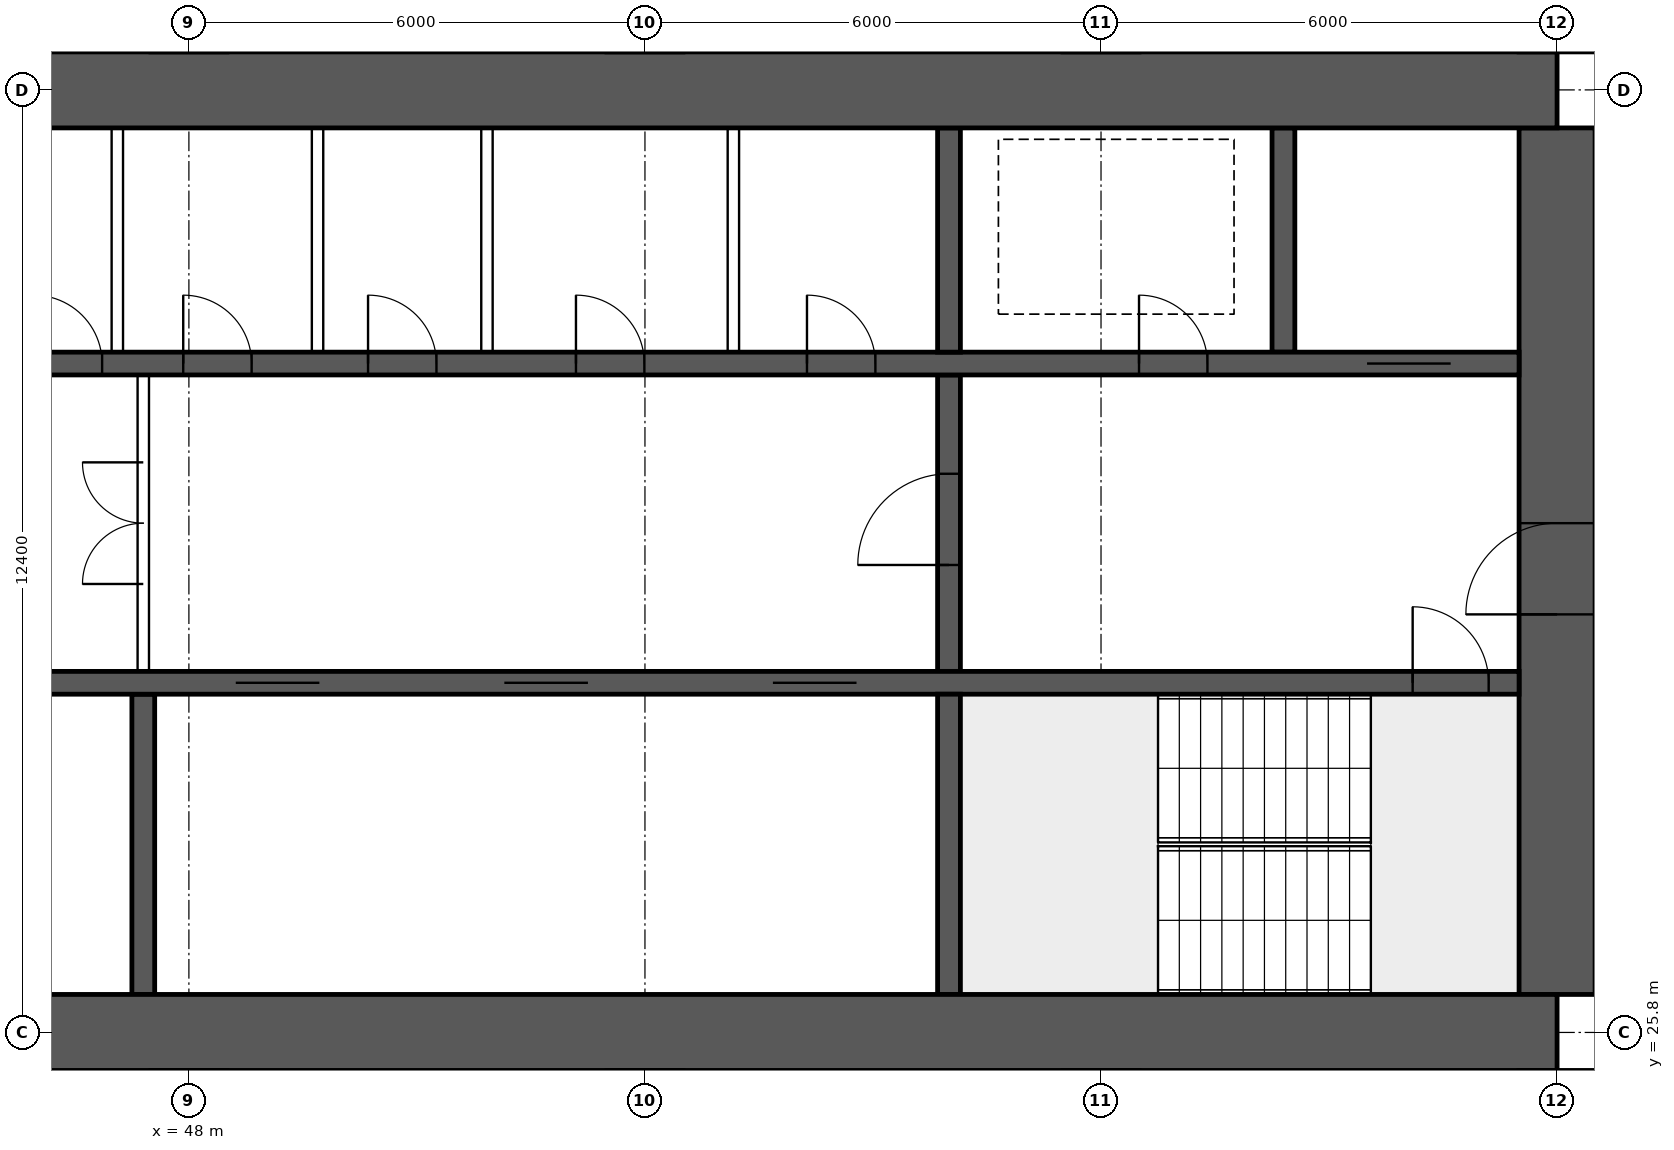
"""IFC4 building model, lengths in metres.
Left out: names, types, materials, properties, quantities, classifications, styles, units other than length and angle.
Written with IfcOpenShell. Run it as: python <this file> out.ifc"""

import sys

from ifc_helpers import new_model, si_unit, direction, frame, frame_2d, origin, place, context, subcontext, project, spatial, rectangle, extrude, element, fill, save


model = new_model("IFC4")
c1 = context("Model", 3, precision=1e-05, world=origin(), true_north=direction((0.0, 1.0)))
c2 = subcontext(c1, "Body", "Model", "MODEL_VIEW")
j1 = project(units=[si_unit("LENGTHUNIT", "METRE"), si_unit("PLANEANGLEUNIT", "RADIAN")], contexts=[c1])
p1 = place(None, origin())
s1 = spatial("IfcSite", under=j1, at=p1, CompositionType="ELEMENT")
p2 = place(p1, origin())
s2 = spatial("IfcBuilding", under=s1, at=p2, CompositionType="ELEMENT")
p3 = place(p2, frame((0.0, 0.0, 31.45)))
s3 = spatial("IfcBuildingStorey", under=s2, at=p3, CompositionType="ELEMENT", Elevation=31.45)
for number, where, z_axis, x_axis in (
    (1, (18.0, 25.8, 0.0), (0.0, 0.0, 1.0), (1.0, 0.0, 0.0)),
    (2, (18.0, 38.2, 0.0), (0.0, 0.0, 1.0), (1.0, 0.0, 0.0)),
):
    element("IfcWall", number, at=place(p3, frame(where, z_axis=z_axis, x_axis=x_axis)), inside=s3, PredefinedType="SHEAR", context=c2, shape_type="SweptSolid", body=[
        extrude(rectangle(XDim=48.0, YDim=1.0, at=frame_2d((24.0, 0.0))), origin(), (0.0, 0.0, 1.0), 3.75),
    ])
p4 = place(p3, frame((66.0, 26.3, 0.0), z_axis=(0.0, 0.0, 1.0), x_axis=(0.0, 1.0, 0.0)))
e3 = element("IfcWall", 3, at=p4, inside=s3, PredefinedType="SHEAR", context=c2, shape_type="SweptSolid", body=[
    extrude(rectangle(XDim=11.4, YDim=1.0, at=frame_2d((5.7, 0.0))), origin(), (0.0, 0.0, 1.0), 3.75),
])
p5 = place(p4, frame((5.0, 0.0, 0.0)))
e4 = element("IfcOpeningElement", 4, at=p5, cuts=e3, PredefinedType="OPENING", context=c2, shape_type="SweptSolid", body=[
    extrude(rectangle(XDim=1.2, YDim=2.1, at=frame_2d((0.6, 1.05))), frame((0.0, 0.51, 0.0), z_axis=(0.0, -1.0, 0.0), x_axis=(1.0, 0.0, 0.0)), (0.0, 0.0, 1.0), 1.02),
])
p6 = place(p3, frame((18.5, 30.4, 0.0), z_axis=(0.0, 0.0, 1.0), x_axis=(1.0, 0.0, 0.0)))
e5 = element("IfcWall", 5, at=p6, inside=s3, PredefinedType="SHEAR", context=c2, shape_type="SweptSolid", body=[
    extrude(rectangle(XDim=47.0, YDim=0.3, at=frame_2d((23.5, 0.0))), origin(), (0.0, 0.0, 1.0), 3.75),
])
p7 = place(p6, frame((0.4, 0.0, 0.0)))
e6 = element("IfcOpeningElement", 6, at=p7, cuts=e5, PredefinedType="OPENING", context=c2, shape_type="SweptSolid", body=[
    extrude(rectangle(XDim=1.0, YDim=2.1, at=frame_2d((0.5, 1.05))), frame((0.0, 0.16, 0.0), z_axis=(0.0, -1.0, 0.0), x_axis=(1.0, 0.0, 0.0)), (0.0, 0.0, 1.0), 0.32),
])
p8 = place(p6, frame((45.6, 0.0, 0.0)))
e7 = element("IfcOpeningElement", 7, at=p8, cuts=e5, PredefinedType="OPENING", context=c2, shape_type="SweptSolid", body=[
    extrude(rectangle(XDim=1.0, YDim=2.1, at=frame_2d((0.5, 1.05))), frame((0.0, 0.16, 0.0), z_axis=(0.0, -1.0, 0.0), x_axis=(1.0, 0.0, 0.0)), (0.0, 0.0, 1.0), 0.32),
])
p9 = place(p6, frame((8.25, 0.0, 0.0)))
e8 = element("IfcOpeningElement", 8, at=p9, cuts=e5, PredefinedType="OPENING", context=c2, shape_type="SweptSolid", body=[
    extrude(rectangle(XDim=1.1, YDim=2.1, at=frame_2d((0.55, 1.05))), frame((0.0, 0.16, 0.0), z_axis=(0.0, -1.0, 0.0), x_axis=(1.0, 0.0, 0.0)), (0.0, 0.0, 1.0), 0.32),
])
p10 = place(p6, frame((10.85, 0.0, 0.0)))
e9 = element("IfcOpeningElement", 9, at=p10, cuts=e5, PredefinedType="OPENING", context=c2, shape_type="SweptSolid", body=[
    extrude(rectangle(XDim=1.1, YDim=2.1, at=frame_2d((0.55, 1.05))), frame((0.0, 0.16, 0.0), z_axis=(0.0, -1.0, 0.0), x_axis=(1.0, 0.0, 0.0)), (0.0, 0.0, 1.0), 0.32),
])
p11 = place(p6, frame((13.45, 0.0, 0.0)))
e10 = element("IfcOpeningElement", 10, at=p11, cuts=e5, PredefinedType="OPENING", context=c2, shape_type="SweptSolid", body=[
    extrude(rectangle(XDim=1.1, YDim=2.1, at=frame_2d((0.55, 1.05))), frame((0.0, 0.16, 0.0), z_axis=(0.0, -1.0, 0.0), x_axis=(1.0, 0.0, 0.0)), (0.0, 0.0, 1.0), 0.32),
])
p12 = place(p6, frame((16.05, 0.0, 0.0)))
e11 = element("IfcOpeningElement", 11, at=p12, cuts=e5, PredefinedType="OPENING", context=c2, shape_type="SweptSolid", body=[
    extrude(rectangle(XDim=1.1, YDim=2.1, at=frame_2d((0.55, 1.05))), frame((0.0, 0.16, 0.0), z_axis=(0.0, -1.0, 0.0), x_axis=(1.0, 0.0, 0.0)), (0.0, 0.0, 1.0), 0.32),
])
p13 = place(p6, frame((30.117, 0.0, 0.0)))
e12 = element("IfcOpeningElement", 12, at=p13, cuts=e5, PredefinedType="OPENING", context=c2, shape_type="SweptSolid", body=[
    extrude(rectangle(XDim=1.1, YDim=2.1, at=frame_2d((0.55, 1.05))), frame((0.0, 0.16, 0.0), z_axis=(0.0, -1.0, 0.0), x_axis=(1.0, 0.0, 0.0)), (0.0, 0.0, 1.0), 0.32),
])
p14 = place(p6, frame((33.65, 0.0, 0.0)))
e13 = element("IfcOpeningElement", 13, at=p14, cuts=e5, PredefinedType="OPENING", context=c2, shape_type="SweptSolid", body=[
    extrude(rectangle(XDim=1.1, YDim=2.1, at=frame_2d((0.55, 1.05))), frame((0.0, 0.16, 0.0), z_axis=(0.0, -1.0, 0.0), x_axis=(1.0, 0.0, 0.0)), (0.0, 0.0, 1.0), 0.32),
])
p15 = place(p6, frame((37.183, 0.0, 0.0)))
e14 = element("IfcOpeningElement", 14, at=p15, cuts=e5, PredefinedType="OPENING", context=c2, shape_type="SweptSolid", body=[
    extrude(rectangle(XDim=1.1, YDim=2.1, at=frame_2d((0.55, 1.05))), frame((0.0, 0.16, 0.0), z_axis=(0.0, -1.0, 0.0), x_axis=(1.0, 0.0, 0.0)), (0.0, 0.0, 1.0), 0.32),
])
p16 = place(p3, frame((18.5, 34.6, 0.0), z_axis=(0.0, 0.0, 1.0), x_axis=(1.0, 0.0, 0.0)))
e15 = element("IfcWall", 15, at=p16, inside=s3, PredefinedType="SHEAR", context=c2, shape_type="SweptSolid", body=[
    extrude(rectangle(XDim=47.0, YDim=0.3, at=frame_2d((23.5, 0.0))), origin(), (0.0, 0.0, 1.0), 3.75),
])
p17 = place(p16, frame((0.9, 0.0, 0.0)))
e16 = element("IfcOpeningElement", 16, at=p17, cuts=e15, PredefinedType="OPENING", context=c2, shape_type="SweptSolid", body=[
    extrude(rectangle(XDim=1.1, YDim=2.1, at=frame_2d((0.55, 1.05))), frame((0.0, 0.16, 0.0), z_axis=(0.0, -1.0, 0.0), x_axis=(1.0, 0.0, 0.0)), (0.0, 0.0, 1.0), 0.32),
])
p18 = place(p16, frame((45.0, 0.0, 0.0)))
e17 = element("IfcOpeningElement", 17, at=p18, cuts=e15, PredefinedType="OPENING", context=c2, shape_type="SweptSolid", body=[
    extrude(rectangle(XDim=1.1, YDim=2.1, at=frame_2d((0.55, 1.05))), frame((0.0, 0.16, 0.0), z_axis=(0.0, -1.0, 0.0), x_axis=(1.0, 0.0, 0.0)), (0.0, 0.0, 1.0), 0.32),
])
p19 = place(p16, frame((4.1, 0.0, 0.0)))
e18 = element("IfcOpeningElement", 18, at=p19, cuts=e15, PredefinedType="OPENING", context=c2, shape_type="SweptSolid", body=[
    extrude(rectangle(XDim=0.9, YDim=2.1, at=frame_2d((0.45, 1.05))), frame((0.0, 0.16, 0.0), z_axis=(0.0, -1.0, 0.0), x_axis=(1.0, 0.0, 0.0)), (0.0, 0.0, 1.0), 0.32),
])
p20 = place(p16, frame((42.0, 0.0, 0.0)))
e19 = element("IfcOpeningElement", 19, at=p20, cuts=e15, PredefinedType="OPENING", context=c2, shape_type="SweptSolid", body=[
    extrude(rectangle(XDim=0.9, YDim=2.1, at=frame_2d((0.45, 1.05))), frame((0.0, 0.16, 0.0), z_axis=(0.0, -1.0, 0.0), x_axis=(1.0, 0.0, 0.0)), (0.0, 0.0, 1.0), 0.32),
])
p21 = place(p16, frame((8.875, 0.0, 0.0)))
e20 = element("IfcOpeningElement", 20, at=p21, cuts=e15, PredefinedType="OPENING", context=c2, shape_type="SweptSolid", body=[
    extrude(rectangle(XDim=0.9, YDim=2.1, at=frame_2d((0.45, 1.05))), frame((0.0, 0.16, 0.0), z_axis=(0.0, -1.0, 0.0), x_axis=(1.0, 0.0, 0.0)), (0.0, 0.0, 1.0), 0.32),
])
p22 = place(p16, frame((12.849, 0.0, 0.0)))
e21 = element("IfcOpeningElement", 21, at=p22, cuts=e15, PredefinedType="OPENING", context=c2, shape_type="SweptSolid", body=[
    extrude(rectangle(XDim=0.9, YDim=2.1, at=frame_2d((0.45, 1.05))), frame((0.0, 0.16, 0.0), z_axis=(0.0, -1.0, 0.0), x_axis=(1.0, 0.0, 0.0)), (0.0, 0.0, 1.0), 0.32),
])
p23 = place(p16, frame((16.496, 0.0, 0.0)))
e22 = element("IfcOpeningElement", 22, at=p23, cuts=e15, PredefinedType="OPENING", context=c2, shape_type="SweptSolid", body=[
    extrude(rectangle(XDim=0.9, YDim=2.1, at=frame_2d((0.45, 1.05))), frame((0.0, 0.16, 0.0), z_axis=(0.0, -1.0, 0.0), x_axis=(1.0, 0.0, 0.0)), (0.0, 0.0, 1.0), 0.32),
])
p24 = place(p16, frame((20.255, 0.0, 0.0)))
e23 = element("IfcOpeningElement", 23, at=p24, cuts=e15, PredefinedType="OPENING", context=c2, shape_type="SweptSolid", body=[
    extrude(rectangle(XDim=0.9, YDim=2.1, at=frame_2d((0.45, 1.05))), frame((0.0, 0.16, 0.0), z_axis=(0.0, -1.0, 0.0), x_axis=(1.0, 0.0, 0.0)), (0.0, 0.0, 1.0), 0.32),
])
p25 = place(p16, frame((24.661, 0.0, 0.0)))
e24 = element("IfcOpeningElement", 24, at=p25, cuts=e15, PredefinedType="OPENING", context=c2, shape_type="SweptSolid", body=[
    extrude(rectangle(XDim=0.9, YDim=2.1, at=frame_2d((0.45, 1.05))), frame((0.0, 0.16, 0.0), z_axis=(0.0, -1.0, 0.0), x_axis=(1.0, 0.0, 0.0)), (0.0, 0.0, 1.0), 0.32),
])
p26 = place(p16, frame((27.458, 0.0, 0.0)))
e25 = element("IfcOpeningElement", 25, at=p26, cuts=e15, PredefinedType="OPENING", context=c2, shape_type="SweptSolid", body=[
    extrude(rectangle(XDim=0.9, YDim=2.1, at=frame_2d((0.45, 1.05))), frame((0.0, 0.16, 0.0), z_axis=(0.0, -1.0, 0.0), x_axis=(1.0, 0.0, 0.0)), (0.0, 0.0, 1.0), 0.32),
])
p27 = place(p16, frame((29.425, 0.0, 0.0)))
e26 = element("IfcOpeningElement", 26, at=p27, cuts=e15, PredefinedType="OPENING", context=c2, shape_type="SweptSolid", body=[
    extrude(rectangle(XDim=0.9, YDim=2.1, at=frame_2d((0.45, 1.05))), frame((0.0, 0.16, 0.0), z_axis=(0.0, -1.0, 0.0), x_axis=(1.0, 0.0, 0.0)), (0.0, 0.0, 1.0), 0.32),
])
p28 = place(p16, frame((31.857, 0.0, 0.0)))
e27 = element("IfcOpeningElement", 27, at=p28, cuts=e15, PredefinedType="OPENING", context=c2, shape_type="SweptSolid", body=[
    extrude(rectangle(XDim=0.9, YDim=2.1, at=frame_2d((0.45, 1.05))), frame((0.0, 0.16, 0.0), z_axis=(0.0, -1.0, 0.0), x_axis=(1.0, 0.0, 0.0)), (0.0, 0.0, 1.0), 0.32),
])
p29 = place(p16, frame((34.592, 0.0, 0.0)))
e28 = element("IfcOpeningElement", 28, at=p29, cuts=e15, PredefinedType="OPENING", context=c2, shape_type="SweptSolid", body=[
    extrude(rectangle(XDim=0.9, YDim=2.1, at=frame_2d((0.45, 1.05))), frame((0.0, 0.16, 0.0), z_axis=(0.0, -1.0, 0.0), x_axis=(1.0, 0.0, 0.0)), (0.0, 0.0, 1.0), 0.32),
])
p30 = place(p16, frame((37.632, 0.0, 0.0)))
e29 = element("IfcOpeningElement", 29, at=p30, cuts=e15, PredefinedType="OPENING", context=c2, shape_type="SweptSolid", body=[
    extrude(rectangle(XDim=0.9, YDim=2.1, at=frame_2d((0.45, 1.05))), frame((0.0, 0.16, 0.0), z_axis=(0.0, -1.0, 0.0), x_axis=(1.0, 0.0, 0.0)), (0.0, 0.0, 1.0), 0.32),
])
p31 = place(p3, frame((58.0, 26.3, 0.0), z_axis=(0.0, 0.0, 1.0), x_axis=(0.0, 1.0, 0.0)))
e30 = element("IfcWall", 30, at=p31, inside=s3, PredefinedType="SHEAR", context=c2, shape_type="SweptSolid", body=[
    extrude(rectangle(XDim=3.95, YDim=0.3, at=frame_2d((1.975, 0.0))), origin(), (0.0, 0.0, 1.0), 3.75),
])
p32 = place(p3, frame((58.0, 30.55, 0.0), z_axis=(0.0, 0.0, 1.0), x_axis=(0.0, 1.0, 0.0)))
e31 = element("IfcWall", 31, at=p32, inside=s3, PredefinedType="SHEAR", context=c2, shape_type="SweptSolid", body=[
    extrude(rectangle(XDim=3.9, YDim=0.3, at=frame_2d((1.95, 0.0))), origin(), (0.0, 0.0, 1.0), 3.75),
])
p33 = place(p32, frame((1.4, 0.0, 0.0)))
e32 = element("IfcOpeningElement", 32, at=p33, cuts=e31, PredefinedType="OPENING", context=c2, shape_type="SweptSolid", body=[
    extrude(rectangle(XDim=1.2, YDim=2.1, at=frame_2d((0.6, 1.05))), frame((0.0, 0.16, 0.0), z_axis=(0.0, -1.0, 0.0), x_axis=(1.0, 0.0, 0.0)), (0.0, 0.0, 1.0), 0.32),
])
for number, where, z_axis, x_axis in (
    (33, (62.4, 34.75, 0.0), (0.0, 0.0, 1.0), (0.0, 1.0, 0.0)),
    (34, (58.0, 34.75, 0.0), (0.0, 0.0, 1.0), (0.0, 1.0, 0.0)),
):
    element("IfcWall", number, at=place(p3, frame(where, z_axis=z_axis, x_axis=x_axis)), inside=s3, PredefinedType="SHEAR", context=c2, shape_type="SweptSolid", body=[
        extrude(rectangle(XDim=2.95, YDim=0.3, at=frame_2d((1.475, 0.0))), origin(), (0.0, 0.0, 1.0), 3.75),
    ])
p34 = place(p3, frame((47.4, 26.3, 0.0), z_axis=(0.0, 0.0, 1.0), x_axis=(0.0, 1.0, 0.0)))
e35 = element("IfcWall", 35, at=p34, inside=s3, PredefinedType="SHEAR", context=c2, shape_type="SweptSolid", body=[
    extrude(rectangle(XDim=3.95, YDim=0.3, at=frame_2d((1.975, 0.0))), origin(), (0.0, 0.0, 1.0), 3.75),
])
p35 = place(p3, frame((47.4, 30.55, 0.0), z_axis=(0.0, 0.0, 1.0), x_axis=(0.0, 1.0, 0.0)))
e36 = element("IfcWall", 36, at=p35, inside=s3, PredefinedType="SOLIDWALL", context=c2, shape_type="SweptSolid", body=[
    extrude(rectangle(XDim=3.9, YDim=0.15, at=frame_2d((1.95, 0.0))), origin(), (0.0, 0.0, 1.0), 3.5),
])
p36 = place(p35, frame((1.15, 0.0, 0.0)))
e37 = element("IfcOpeningElement", 37, at=p36, cuts=e36, PredefinedType="OPENING", context=c2, shape_type="SweptSolid", body=[
    extrude(rectangle(XDim=1.6, YDim=2.1, at=frame_2d((0.8, 1.05))), frame((0.0, 0.085, 0.0), z_axis=(0.0, -1.0, 0.0), x_axis=(1.0, 0.0, 0.0)), (0.0, 0.0, 1.0), 0.17),
])
for number, where, z_axis, x_axis in (
    (38, (47.058, 34.75, 0.0), (0.0, 0.0, 1.0), (0.0, 1.0, 0.0)),
    (39, (49.692, 34.75, 0.0), (0.0, 0.0, 1.0), (0.0, 1.0, 0.0)),
    (40, (51.921, 34.75, 0.0), (0.0, 0.0, 1.0), (0.0, 1.0, 0.0)),
    (41, (55.163, 34.75, 0.0), (0.0, 0.0, 1.0), (0.0, 1.0, 0.0)),
):
    element("IfcWall", number, at=place(p3, frame(where, z_axis=z_axis, x_axis=x_axis)), inside=s3, PredefinedType="SOLIDWALL", context=c2, shape_type="SweptSolid", body=[
        extrude(rectangle(XDim=2.95, YDim=0.15, at=frame_2d((1.475, 0.0))), origin(), (0.0, 0.0, 1.0), 3.5),
    ])
for number, where, z_axis, x_axis in (
    (42, (51.36, 14.9, 0.0), (0.0, 0.0, 1.0), (0.0, 1.0, 0.0)),
    (43, (57.805, 14.9, 0.0), (0.0, 0.0, 1.0), (0.0, 1.0, 0.0)),
    (44, (62.085, 14.9, 0.0), (0.0, 0.0, 1.0), (0.0, 1.0, 0.0)),
):
    element("IfcWall", number, at=place(p3, frame(where, z_axis=z_axis, x_axis=x_axis)), inside=s3, PredefinedType="PARTITIONING", context=c2, shape_type="SweptSolid", body=[
        extrude(rectangle(XDim=10.4, YDim=0.15, at=frame_2d((5.2, 0.0))), origin(), (0.0, 0.0, 1.0), 3.5),
    ])
p37 = place(p36, origin())
e45 = element("IfcDoor", 45, at=p37, inside=s3, OperationType="DOUBLE_DOOR_SINGLE_SWING", PredefinedType="DOOR", context=c2, shape_type="SweptSolid", body=[
    extrude(rectangle(XDim=1.6, YDim=2.1, at=frame_2d((0.8, 1.05))), frame((0.0, 0.025, 0.0), z_axis=(0.0, -1.0, 0.0), x_axis=(1.0, 0.0, 0.0)), (0.0, 0.0, 1.0), 0.05),
])
fill(e37, e45)
p38 = place(p5, origin())
e46 = element("IfcDoor", 46, at=p38, inside=s3, OperationType="SINGLE_SWING_LEFT", PredefinedType="DOOR", context=c2, shape_type="SweptSolid", body=[
    extrude(rectangle(XDim=1.2, YDim=2.1, at=frame_2d((0.6, 1.05))), frame((0.0, 0.025, 0.0), z_axis=(0.0, -1.0, 0.0), x_axis=(1.0, 0.0, 0.0)), (0.0, 0.0, 1.0), 0.05),
])
fill(e4, e46)
p39 = place(p8, origin())
e47 = element("IfcDoor", 47, at=p39, inside=s3, OperationType="SINGLE_SWING_LEFT", PredefinedType="DOOR", context=c2, shape_type="SweptSolid", body=[
    extrude(rectangle(XDim=1.0, YDim=2.1, at=frame_2d((0.5, 1.05))), frame((0.0, 0.025, 0.0), z_axis=(0.0, -1.0, 0.0), x_axis=(1.0, 0.0, 0.0)), (0.0, 0.0, 1.0), 0.05),
])
fill(e7, e47)
p40 = place(p18, origin())
e48 = element("IfcDoor", 48, at=p40, inside=s3, OperationType="DOUBLE_DOOR_SLIDING", PredefinedType="DOOR", context=c2, shape_type="SweptSolid", body=[
    extrude(rectangle(XDim=1.1, YDim=2.1, at=frame_2d((0.55, 1.05))), frame((0.0, 0.025, 0.0), z_axis=(0.0, -1.0, 0.0), x_axis=(1.0, 0.0, 0.0)), (0.0, 0.0, 1.0), 0.05),
])
fill(e17, e48)
p41 = place(p20, origin())
e49 = element("IfcDoor", 49, at=p41, inside=s3, OperationType="SINGLE_SWING_LEFT", PredefinedType="DOOR", context=c2, shape_type="SweptSolid", body=[
    extrude(rectangle(XDim=0.9, YDim=2.1, at=frame_2d((0.45, 1.05))), frame((0.0, 0.025, 0.0), z_axis=(0.0, -1.0, 0.0), x_axis=(1.0, 0.0, 0.0)), (0.0, 0.0, 1.0), 0.05),
])
fill(e19, e49)
p42 = place(p33, origin())
e50 = element("IfcDoor", 50, at=p42, inside=s3, OperationType="SINGLE_SWING_LEFT", PredefinedType="DOOR", context=c2, shape_type="SweptSolid", body=[
    extrude(rectangle(XDim=1.2, YDim=2.1, at=frame_2d((0.6, 1.05))), frame((0.0, 0.025, 0.0), z_axis=(0.0, -1.0, 0.0), x_axis=(1.0, 0.0, 0.0)), (0.0, 0.0, 1.0), 0.05),
])
fill(e32, e50)
p43 = place(p26, origin())
e51 = element("IfcDoor", 51, at=p43, inside=s3, OperationType="SINGLE_SWING_LEFT", PredefinedType="DOOR", context=c2, shape_type="SweptSolid", body=[
    extrude(rectangle(XDim=0.9, YDim=2.1, at=frame_2d((0.45, 1.05))), frame((0.0, 0.025, 0.0), z_axis=(0.0, -1.0, 0.0), x_axis=(1.0, 0.0, 0.0)), (0.0, 0.0, 1.0), 0.05),
])
fill(e25, e51)
p44 = place(p27, origin())
e52 = element("IfcDoor", 52, at=p44, inside=s3, OperationType="SINGLE_SWING_LEFT", PredefinedType="DOOR", context=c2, shape_type="SweptSolid", body=[
    extrude(rectangle(XDim=0.9, YDim=2.1, at=frame_2d((0.45, 1.05))), frame((0.0, 0.025, 0.0), z_axis=(0.0, -1.0, 0.0), x_axis=(1.0, 0.0, 0.0)), (0.0, 0.0, 1.0), 0.05),
])
fill(e26, e52)
p45 = place(p28, origin())
e53 = element("IfcDoor", 53, at=p45, inside=s3, OperationType="SINGLE_SWING_LEFT", PredefinedType="DOOR", context=c2, shape_type="SweptSolid", body=[
    extrude(rectangle(XDim=0.9, YDim=2.1, at=frame_2d((0.45, 1.05))), frame((0.0, 0.025, 0.0), z_axis=(0.0, -1.0, 0.0), x_axis=(1.0, 0.0, 0.0)), (0.0, 0.0, 1.0), 0.05),
])
fill(e27, e53)
p46 = place(p29, origin())
e54 = element("IfcDoor", 54, at=p46, inside=s3, OperationType="SINGLE_SWING_LEFT", PredefinedType="DOOR", context=c2, shape_type="SweptSolid", body=[
    extrude(rectangle(XDim=0.9, YDim=2.1, at=frame_2d((0.45, 1.05))), frame((0.0, 0.025, 0.0), z_axis=(0.0, -1.0, 0.0), x_axis=(1.0, 0.0, 0.0)), (0.0, 0.0, 1.0), 0.05),
])
fill(e28, e54)
p47 = place(p30, origin())
e55 = element("IfcDoor", 55, at=p47, inside=s3, OperationType="SINGLE_SWING_LEFT", PredefinedType="DOOR", context=c2, shape_type="SweptSolid", body=[
    extrude(rectangle(XDim=0.9, YDim=2.1, at=frame_2d((0.45, 1.05))), frame((0.0, 0.025, 0.0), z_axis=(0.0, -1.0, 0.0), x_axis=(1.0, 0.0, 0.0)), (0.0, 0.0, 1.0), 0.05),
])
fill(e29, e55)
p48 = place(p13, origin())
e56 = element("IfcDoor", 56, at=p48, inside=s3, OperationType="DOUBLE_DOOR_SLIDING", PredefinedType="DOOR", context=c2, shape_type="SweptSolid", body=[
    extrude(rectangle(XDim=1.1, YDim=2.1, at=frame_2d((0.55, 1.05))), frame((0.0, 0.025, 0.0), z_axis=(0.0, -1.0, 0.0), x_axis=(1.0, 0.0, 0.0)), (0.0, 0.0, 1.0), 0.05),
])
fill(e12, e56)
p49 = place(p14, origin())
e57 = element("IfcDoor", 57, at=p49, inside=s3, OperationType="DOUBLE_DOOR_SLIDING", PredefinedType="DOOR", context=c2, shape_type="SweptSolid", body=[
    extrude(rectangle(XDim=1.1, YDim=2.1, at=frame_2d((0.55, 1.05))), frame((0.0, 0.025, 0.0), z_axis=(0.0, -1.0, 0.0), x_axis=(1.0, 0.0, 0.0)), (0.0, 0.0, 1.0), 0.05),
])
fill(e13, e57)
p50 = place(p15, origin())
e58 = element("IfcDoor", 58, at=p50, inside=s3, OperationType="DOUBLE_DOOR_SLIDING", PredefinedType="DOOR", context=c2, shape_type="SweptSolid", body=[
    extrude(rectangle(XDim=1.1, YDim=2.1, at=frame_2d((0.55, 1.05))), frame((0.0, 0.025, 0.0), z_axis=(0.0, -1.0, 0.0), x_axis=(1.0, 0.0, 0.0)), (0.0, 0.0, 1.0), 0.05),
])
fill(e14, e58)
save(model, sys.argv[1])
